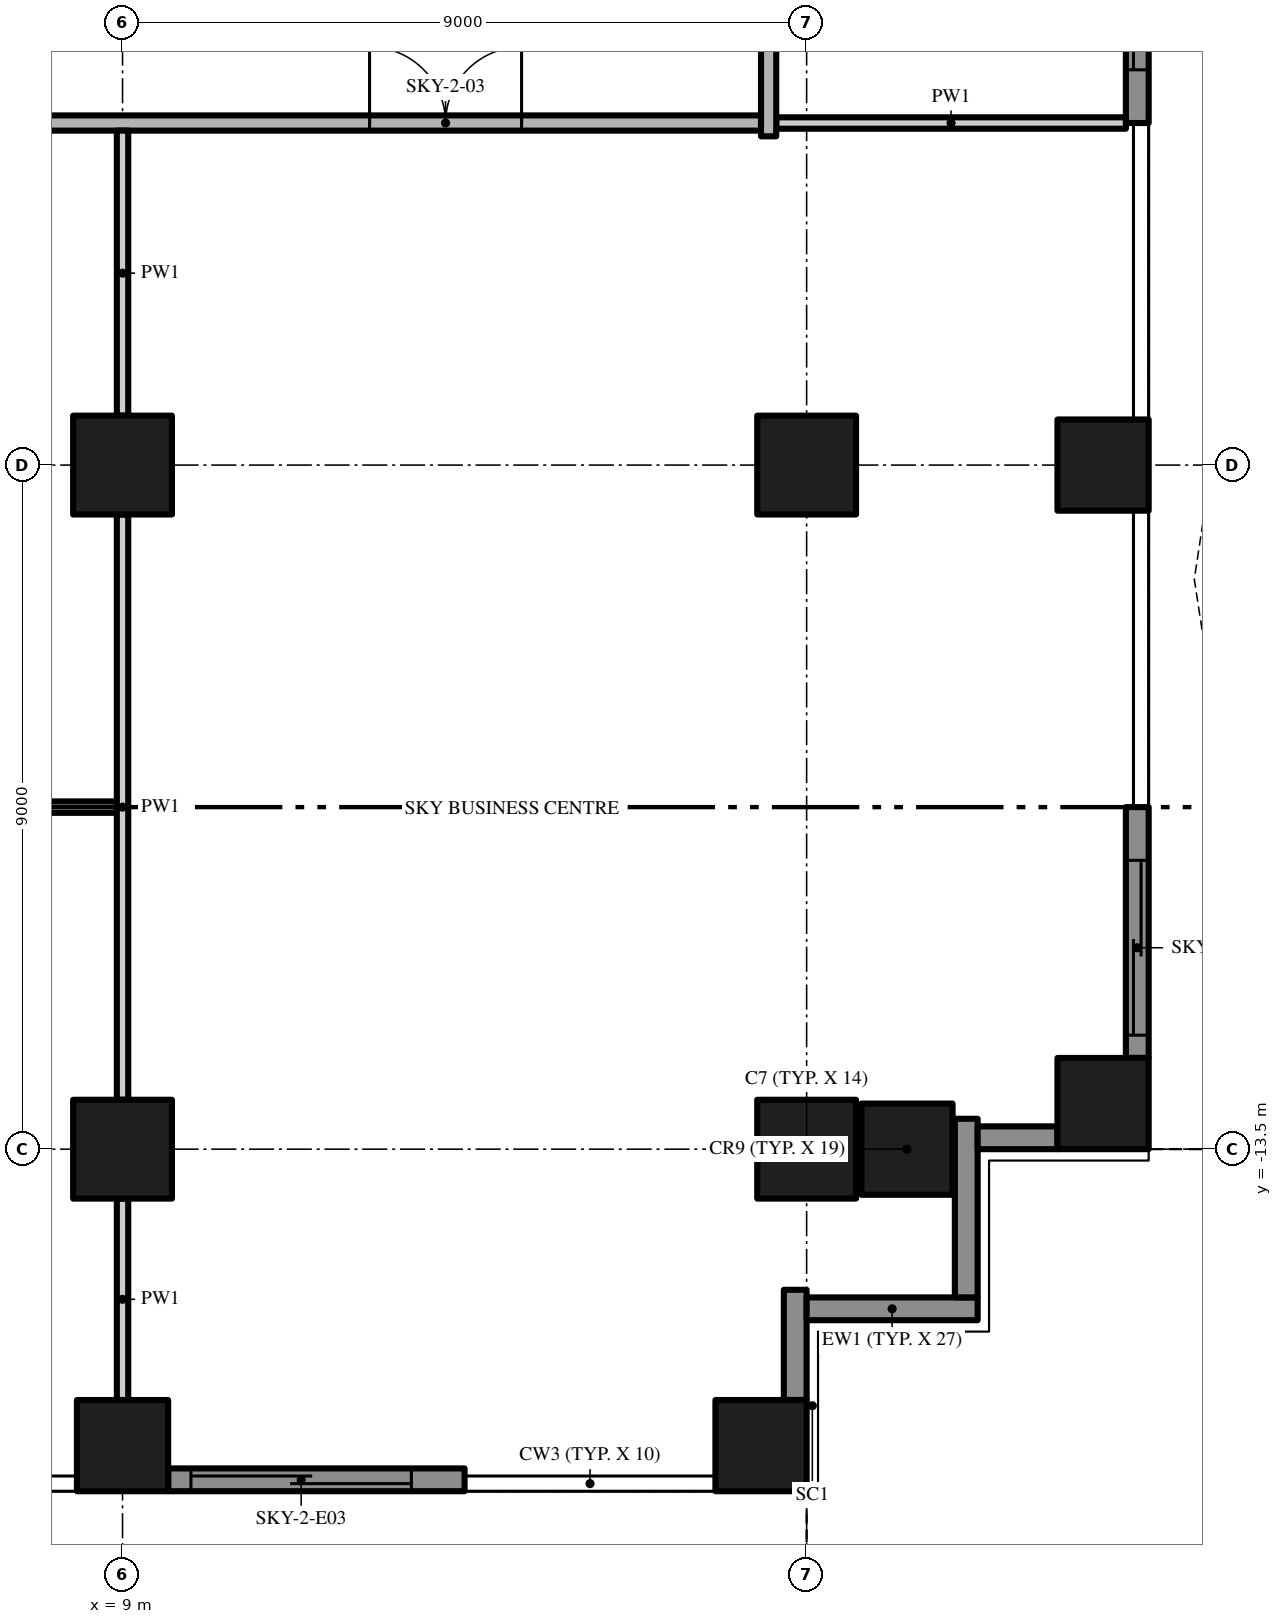
"""IFC4 building model, lengths in metres.
Left out: names, types, materials, properties, quantities, classifications, styles, units other than length and angle.
Written with IfcOpenShell. Run it as: python <this file> out.ifc"""

import sys

from ifc_helpers import new_model, si_unit, direction, frame, frame_2d, origin, origin_2d, place, context, subcontext, project, spatial, polyline, rectangle, outline, extrude, element, fill, save


model = new_model("IFC4")
c1 = context("Model", 3, precision=1e-05, world=origin(), true_north=direction((0.0, 1.0)))
c2 = subcontext(c1, "Body", "Model", "MODEL_VIEW")
j1 = project(units=[si_unit("LENGTHUNIT", "METRE"), si_unit("PLANEANGLEUNIT", "RADIAN")], contexts=[c1])
p1 = place(None, origin())
s1 = spatial("IfcSite", under=j1, at=p1, CompositionType="ELEMENT")
p2 = place(p1, origin())
s2 = spatial("IfcBuilding", under=s1, at=p2, CompositionType="ELEMENT")
p3 = place(p2, frame((0.0, 0.0, 120.0)))
s3 = spatial("IfcBuildingStorey", under=s2, at=p3, CompositionType="ELEMENT", Elevation=120.0)
p4 = place(p3, frame((18.0, -13.5, 0.0), z_axis=(0.0, 0.0, 1.0), x_axis=(1.0, 0.0, 0.0)))
e1 = element("IfcColumn", 1, at=p4, inside=s3, PredefinedType="COLUMN", context=c2, shape_type="SweptSolid", body=[
    extrude(rectangle(XDim=1.3, YDim=1.3, at=origin_2d()), origin(), (0.0, 0.0, 1.0), 4.7),
])
p5 = place(p3, frame((17.4, -17.4, 0.0), z_axis=(0.0, 0.0, 1.0), x_axis=(1.0, 0.0, 0.0)))
e2 = element("IfcColumn", 2, at=p5, inside=s3, PredefinedType="COLUMN", context=c2, shape_type="SweptSolid", body=[
    extrude(rectangle(XDim=1.2, YDim=1.2, at=origin_2d()), origin(), (0.0, 0.0, 1.0), 4.7),
])
p6 = place(p3, frame((18.0, -4.5, 0.0), z_axis=(0.0, 0.0, 1.0), x_axis=(1.0, 0.0, 0.0)))
e3 = element("IfcColumn", 3, at=p6, inside=s3, PredefinedType="COLUMN", context=c2, shape_type="SweptSolid", body=[
    extrude(rectangle(XDim=1.3, YDim=1.3, at=origin_2d()), origin(), (0.0, 0.0, 1.0), 4.7),
])
for number, where, z_axis, x_axis in (
    (4, (21.9, -12.9, 0.0), (0.0, 0.0, 1.0), (1.0, 0.0, 0.0)),
    (5, (19.32, -13.5, 0.0), (0.0, 0.0, 1.0), (1.0, 0.0, 0.0)),
    (6, (21.9, -4.5, 0.0), (0.0, 0.0, 1.0), (1.0, 0.0, 0.0)),
):
    element("IfcColumn", number, at=place(p3, frame(where, z_axis=z_axis, x_axis=x_axis)), inside=s3, PredefinedType="COLUMN", context=c2, shape_type="SweptSolid", body=[
        extrude(rectangle(XDim=1.2, YDim=1.2, at=origin_2d()), origin(), (0.0, 0.0, 1.0), 4.7),
    ])
p7 = place(p3, frame((9.0, -13.5, 0.0), z_axis=(0.0, 0.0, 1.0), x_axis=(1.0, 0.0, 0.0)))
e7 = element("IfcColumn", 7, at=p7, inside=s3, PredefinedType="COLUMN", context=c2, shape_type="SweptSolid", body=[
    extrude(rectangle(XDim=1.3, YDim=1.3, at=origin_2d()), origin(), (0.0, 0.0, 1.0), 4.7),
])
p8 = place(p3, frame((9.0, -17.4, 0.0), z_axis=(0.0, 0.0, 1.0), x_axis=(1.0, 0.0, 0.0)))
e8 = element("IfcColumn", 8, at=p8, inside=s3, PredefinedType="COLUMN", context=c2, shape_type="SweptSolid", body=[
    extrude(rectangle(XDim=1.2, YDim=1.2, at=origin_2d()), origin(), (0.0, 0.0, 1.0), 4.7),
])
p9 = place(p3, frame((9.0, -4.5, 0.0), z_axis=(0.0, 0.0, 1.0), x_axis=(1.0, 0.0, 0.0)))
e9 = element("IfcColumn", 9, at=p9, inside=s3, PredefinedType="COLUMN", context=c2, shape_type="SweptSolid", body=[
    extrude(rectangle(XDim=1.3, YDim=1.3, at=origin_2d()), origin(), (0.0, 0.0, 1.0), 4.7),
])
p10 = place(p3, frame((13.5, -17.85, 0.0), z_axis=(0.0, 0.0, 1.0), x_axis=(-1.0, 0.0, 0.0)))
e10 = element("IfcWall", 10, at=p10, inside=s3, PredefinedType="SOLIDWALL", context=c2, shape_type="SweptSolid", body=[
    extrude(rectangle(XDim=3.9, YDim=0.3, at=frame_2d((1.95, 0.0))), origin(), (0.0, 0.0, 1.0), 4.7),
])
p11 = place(p10, frame((0.7, 0.0, 0.0)))
e11 = element("IfcOpeningElement", 11, at=p11, cuts=e10, PredefinedType="OPENING", context=c2, shape_type="SweptSolid", body=[
    extrude(rectangle(XDim=2.9, YDim=2.4, at=frame_2d((1.45, 1.2))), frame((0.0, 0.16, 0.0), z_axis=(0.0, -1.0, 0.0), x_axis=(1.0, 0.0, 0.0)), (0.0, 0.0, 1.0), 0.32),
])
p12 = place(p3, frame((17.85, -15.35, 0.0), z_axis=(0.0, 0.0, 1.0), x_axis=(0.0, -1.0, 0.0)))
e12 = element("IfcWall", 12, at=p12, inside=s3, PredefinedType="SOLIDWALL", context=c2, shape_type="SweptSolid", body=[
    extrude(rectangle(XDim=1.45, YDim=0.3, at=frame_2d((0.725, 0.0))), origin(), (0.0, 0.0, 1.0), 4.7),
])
p13 = place(p3, frame((20.25, -15.6, 0.0), z_axis=(0.0, 0.0, 1.0), x_axis=(-1.0, 0.0, 0.0)))
e13 = element("IfcWall", 13, at=p13, inside=s3, PredefinedType="SOLIDWALL", context=c2, shape_type="SweptSolid", body=[
    extrude(rectangle(XDim=2.25, YDim=0.3, at=frame_2d((1.125, 0.0))), origin(), (0.0, 0.0, 1.0), 4.7),
])
p14 = place(p3, frame((20.1, -13.1, 0.0), z_axis=(0.0, 0.0, 1.0), x_axis=(0.0, -1.0, 0.0)))
e14 = element("IfcWall", 14, at=p14, inside=s3, PredefinedType="SOLIDWALL", context=c2, shape_type="SweptSolid", body=[
    extrude(rectangle(XDim=2.35, YDim=0.3, at=frame_2d((1.175, 0.0))), origin(), (0.0, 0.0, 1.0), 4.7),
])
p15 = place(p3, frame((21.3, -13.35, 0.0), z_axis=(0.0, 0.0, 1.0), x_axis=(-1.0, 0.0, 0.0)))
e15 = element("IfcWall", 15, at=p15, inside=s3, PredefinedType="SOLIDWALL", context=c2, shape_type="SweptSolid", body=[
    extrude(rectangle(XDim=1.05, YDim=0.3, at=frame_2d((0.525, 0.0))), origin(), (0.0, 0.0, 1.0), 4.7),
])
p16 = place(p3, frame((22.35, -9.0, 0.0), z_axis=(0.0, 0.0, 1.0), x_axis=(0.0, -1.0, 0.0)))
e16 = element("IfcWall", 16, at=p16, inside=s3, PredefinedType="SOLIDWALL", context=c2, shape_type="SweptSolid", body=[
    extrude(rectangle(XDim=3.3, YDim=0.3, at=frame_2d((1.65, 0.0))), origin(), (0.0, 0.0, 1.0), 4.7),
])
p17 = place(p16, frame((0.7, 0.0, 0.0)))
e17 = element("IfcOpeningElement", 17, at=p17, cuts=e16, PredefinedType="OPENING", context=c2, shape_type="SweptSolid", body=[
    extrude(rectangle(XDim=2.3, YDim=2.4, at=frame_2d((1.15, 1.2))), frame((0.0, 0.16, 0.0), z_axis=(0.0, -1.0, 0.0), x_axis=(1.0, 0.0, 0.0)), (0.0, 0.0, 1.0), 0.32),
])
p18 = place(p3, frame((22.35, 3.9, 0.0), z_axis=(0.0, 0.0, 1.0), x_axis=(0.0, -1.0, 0.0)))
e18 = element("IfcWall", 18, at=p18, inside=s3, PredefinedType="SOLIDWALL", context=c2, shape_type="SweptSolid", body=[
    extrude(rectangle(XDim=3.9, YDim=0.3, at=frame_2d((1.95, 0.0))), origin(), (0.0, 0.0, 1.0), 4.7),
])
p19 = place(p18, frame((0.3, 0.0, 0.0)))
e19 = element("IfcOpeningElement", 19, at=p19, cuts=e18, PredefinedType="OPENING", context=c2, shape_type="SweptSolid", body=[
    extrude(rectangle(XDim=2.9, YDim=2.4, at=frame_2d((1.45, 1.2))), frame((0.0, 0.16, 0.0), z_axis=(0.0, -1.0, 0.0), x_axis=(1.0, 0.0, 0.0)), (0.0, 0.0, 1.0), 0.32),
])
p20 = place(p3, origin())
e20 = element("IfcWall", 20, at=p20, inside=s3, PredefinedType="USERDEFINED", context=c2, shape_type="SweptSolid", body=[
    extrude(outline(polyline([(-18.0, -21.0), (-16.5, -20.771), (-15.0, -20.171), (-13.5, -19.429), (-12.0, -18.829), (-10.5, -18.6), (-9.0, -18.829), (-7.5, -19.429), (-6.0, -20.171), (-4.5, -20.771), (-3.0, -21.0), (-1.5, -20.771), (0.0, -20.171), (1.5, -19.429), (3.0, -18.829), (4.5, -18.6), (6.0, -18.829), (7.5, -19.429), (9.0, -20.171), (10.5, -20.771), (12.0, -21.0), (13.5, -20.771), (15.0, -20.171), (16.5, -19.429), (18.0, -18.829), (17.907, -18.597), (16.398, -19.201), (14.898, -19.942), (13.434, -20.528), (12.0, -20.747), (10.566, -20.528), (9.102, -19.942), (7.602, -19.201), (6.066, -18.586), (4.5, -18.347), (2.934, -18.586), (1.398, -19.201), (-0.102, -19.942), (-1.566, -20.528), (-3.0, -20.747), (-4.434, -20.528), (-5.898, -19.942), (-7.398, -19.201), (-8.934, -18.586), (-10.5, -18.347), (-12.066, -18.586), (-13.602, -19.201), (-15.102, -19.942), (-16.566, -20.528), (-18.038, -20.753), (-18.0, -21.0)])), origin(), (0.0, 0.0, 1.0), 0.9),
])
p21 = place(p3, origin())
e21 = element("IfcWall", 21, at=p21, inside=s3, PredefinedType="USERDEFINED", context=c2, shape_type="SweptSolid", body=[
    extrude(outline(polyline([(25.5, -13.5), (25.271, -12.0), (24.671, -10.5), (23.929, -9.0), (23.329, -7.5), (23.1, -6.0), (23.329, -4.5), (23.929, -3.0), (24.671, -1.5), (25.271, 0.0), (25.5, 1.5), (25.271, 3.0), (24.671, 4.5), (23.929, 6.0), (23.329, 7.5), (23.1, 9.0), (23.329, 10.5), (23.929, 12.0), (24.671, 13.5), (25.271, 15.0), (25.5, 16.5), (25.271, 18.0), (25.024, 17.962), (25.247, 16.5), (25.028, 15.066), (24.442, 13.602), (23.701, 12.102), (23.086, 10.566), (22.847, 9.0), (23.086, 7.434), (23.701, 5.898), (24.442, 4.398), (25.028, 2.934), (25.247, 1.5), (25.028, 0.066), (24.442, -1.398), (23.701, -2.898), (23.086, -4.434), (22.847, -6.0), (23.086, -7.566), (23.701, -9.102), (24.442, -10.602), (25.028, -12.066), (25.253, -13.538), (25.5, -13.5)])), origin(), (0.0, 0.0, 1.0), 0.9),
])
p22 = place(p3, frame((-8.925, -9.0, 0.0), z_axis=(0.0, 0.0, 1.0), x_axis=(1.0, 0.0, 0.0)))
e22 = element("IfcWall", 22, at=p22, inside=s3, PredefinedType="PARTITIONING", context=c2, shape_type="SweptSolid", body=[
    extrude(rectangle(XDim=17.85, YDim=0.15, at=frame_2d((8.925, 0.0))), origin(), (0.0, 0.0, 1.0), 4.7),
])
p23 = place(p22, frame((8.05, 0.0, 0.0)))
e23 = element("IfcOpeningElement", 23, at=p23, cuts=e22, PredefinedType="OPENING", context=c2, shape_type="SweptSolid", body=[
    extrude(rectangle(XDim=1.8, YDim=2.4, at=frame_2d((0.9, 1.2))), frame((0.0, 0.085, 0.0), z_axis=(0.0, -1.0, 0.0), x_axis=(1.0, 0.0, 0.0)), (0.0, 0.0, 1.0), 0.17),
])
p24 = place(p3, frame((-17.4, 0.0, 0.0), z_axis=(0.0, 0.0, 1.0), x_axis=(1.0, 0.0, 0.0)))
e24 = element("IfcWall", 24, at=p24, inside=s3, PredefinedType="PARTITIONING", context=c2, shape_type="SweptSolid", body=[
    extrude(rectangle(XDim=34.8, YDim=0.2, at=frame_2d((17.4, 0.0))), origin(), (0.0, 0.0, 1.0), 4.7),
])
p25 = place(p24, frame((3.15, 0.0, 0.0)))
e25 = element("IfcOpeningElement", 25, at=p25, cuts=e24, PredefinedType="OPENING", context=c2, shape_type="SweptSolid", body=[
    extrude(rectangle(XDim=2.0, YDim=2.4, at=frame_2d((1.0, 1.2))), frame((0.0, 0.11, 0.0), z_axis=(0.0, -1.0, 0.0), x_axis=(1.0, 0.0, 0.0)), (0.0, 0.0, 1.0), 0.22),
])
p26 = place(p24, frame((16.4, 0.0, 0.0)))
e26 = element("IfcOpeningElement", 26, at=p26, cuts=e24, PredefinedType="OPENING", context=c2, shape_type="SweptSolid", body=[
    extrude(rectangle(XDim=2.0, YDim=2.4, at=frame_2d((1.0, 1.2))), frame((0.0, 0.11, 0.0), z_axis=(0.0, -1.0, 0.0), x_axis=(1.0, 0.0, 0.0)), (0.0, 0.0, 1.0), 0.22),
])
p27 = place(p24, frame((29.65, 0.0, 0.0)))
e27 = element("IfcOpeningElement", 27, at=p27, cuts=e24, PredefinedType="OPENING", context=c2, shape_type="SweptSolid", body=[
    extrude(rectangle(XDim=2.0, YDim=2.4, at=frame_2d((1.0, 1.2))), frame((0.0, 0.11, 0.0), z_axis=(0.0, -1.0, 0.0), x_axis=(1.0, 0.0, 0.0)), (0.0, 0.0, 1.0), 0.22),
])
p28 = place(p3, frame((17.6, 0.0, 0.0), z_axis=(0.0, 0.0, 1.0), x_axis=(1.0, 0.0, 0.0)))
e28 = element("IfcWall", 28, at=p28, inside=s3, PredefinedType="PARTITIONING", context=c2, shape_type="SweptSolid", body=[
    extrude(rectangle(XDim=4.6, YDim=0.15, at=frame_2d((2.3, 0.0))), origin(), (0.0, 0.0, 1.0), 4.7),
])
p29 = place(p3, frame((9.0, -16.8, 0.0), z_axis=(0.0, 0.0, 1.0), x_axis=(0.0, 1.0, 0.0)))
e29 = element("IfcWall", 29, at=p29, inside=s3, PredefinedType="PARTITIONING", context=c2, shape_type="SweptSolid", body=[
    extrude(rectangle(XDim=2.65, YDim=0.15, at=frame_2d((1.325, 0.0))), origin(), (0.0, 0.0, 1.0), 4.7),
])
p30 = place(p3, frame((9.0, -12.85, 0.0), z_axis=(0.0, 0.0, 1.0), x_axis=(0.0, 1.0, 0.0)))
e30 = element("IfcWall", 30, at=p30, inside=s3, PredefinedType="PARTITIONING", context=c2, shape_type="SweptSolid", body=[
    extrude(rectangle(XDim=7.7, YDim=0.15, at=frame_2d((3.85, 0.0))), origin(), (0.0, 0.0, 1.0), 4.7),
])
p31 = place(p3, frame((9.0, -3.85, 0.0), z_axis=(0.0, 0.0, 1.0), x_axis=(0.0, 1.0, 0.0)))
e31 = element("IfcWall", 31, at=p31, inside=s3, PredefinedType="PARTITIONING", context=c2, shape_type="SweptSolid", body=[
    extrude(rectangle(XDim=3.75, YDim=0.15, at=frame_2d((1.875, 0.0))), origin(), (0.0, 0.0, 1.0), 4.7),
])
p32 = place(p3, frame((17.5, -0.175, 0.0), z_axis=(0.0, 0.0, 1.0), x_axis=(0.0, 1.0, 0.0)))
e32 = element("IfcWall", 32, at=p32, inside=s3, PredefinedType="PARTITIONING", context=c2, shape_type="SweptSolid", body=[
    extrude(rectangle(XDim=4.025, YDim=0.2, at=frame_2d((2.013, 0.0))), origin(), (0.0, 0.0, 1.0), 4.7),
])
p33 = place(p11, origin())
e33 = element("IfcDoor", 33, at=p33, inside=s3, OperationType="SINGLE_SWING_LEFT", PredefinedType="DOOR", context=c2, shape_type="SweptSolid", body=[
    extrude(rectangle(XDim=2.9, YDim=2.4, at=frame_2d((1.45, 1.2))), frame((0.0, 0.025, 0.0), z_axis=(0.0, -1.0, 0.0), x_axis=(1.0, 0.0, 0.0)), (0.0, 0.0, 1.0), 0.05),
])
fill(e11, e33)
p34 = place(p17, origin())
e34 = element("IfcDoor", 34, at=p34, inside=s3, OperationType="SINGLE_SWING_LEFT", PredefinedType="DOOR", context=c2, shape_type="SweptSolid", body=[
    extrude(rectangle(XDim=2.3, YDim=2.4, at=frame_2d((1.15, 1.2))), frame((0.0, 0.025, 0.0), z_axis=(0.0, -1.0, 0.0), x_axis=(1.0, 0.0, 0.0)), (0.0, 0.0, 1.0), 0.05),
])
fill(e17, e34)
p35 = place(p19, origin())
e35 = element("IfcDoor", 35, at=p35, inside=s3, OperationType="SINGLE_SWING_LEFT", PredefinedType="DOOR", context=c2, shape_type="SweptSolid", body=[
    extrude(rectangle(XDim=2.9, YDim=2.4, at=frame_2d((1.45, 1.2))), frame((0.0, 0.025, 0.0), z_axis=(0.0, -1.0, 0.0), x_axis=(1.0, 0.0, 0.0)), (0.0, 0.0, 1.0), 0.05),
])
fill(e19, e35)
p36 = place(p27, origin())
e36 = element("IfcDoor", 36, at=p36, inside=s3, OperationType="DOUBLE_DOOR_SINGLE_SWING", PredefinedType="DOOR", context=c2, shape_type="SweptSolid", body=[
    extrude(rectangle(XDim=2.0, YDim=2.4, at=frame_2d((1.0, 1.2))), frame((0.0, 0.025, 0.0), z_axis=(0.0, -1.0, 0.0), x_axis=(1.0, 0.0, 0.0)), (0.0, 0.0, 1.0), 0.05),
])
fill(e27, e36)
save(model, sys.argv[1])
